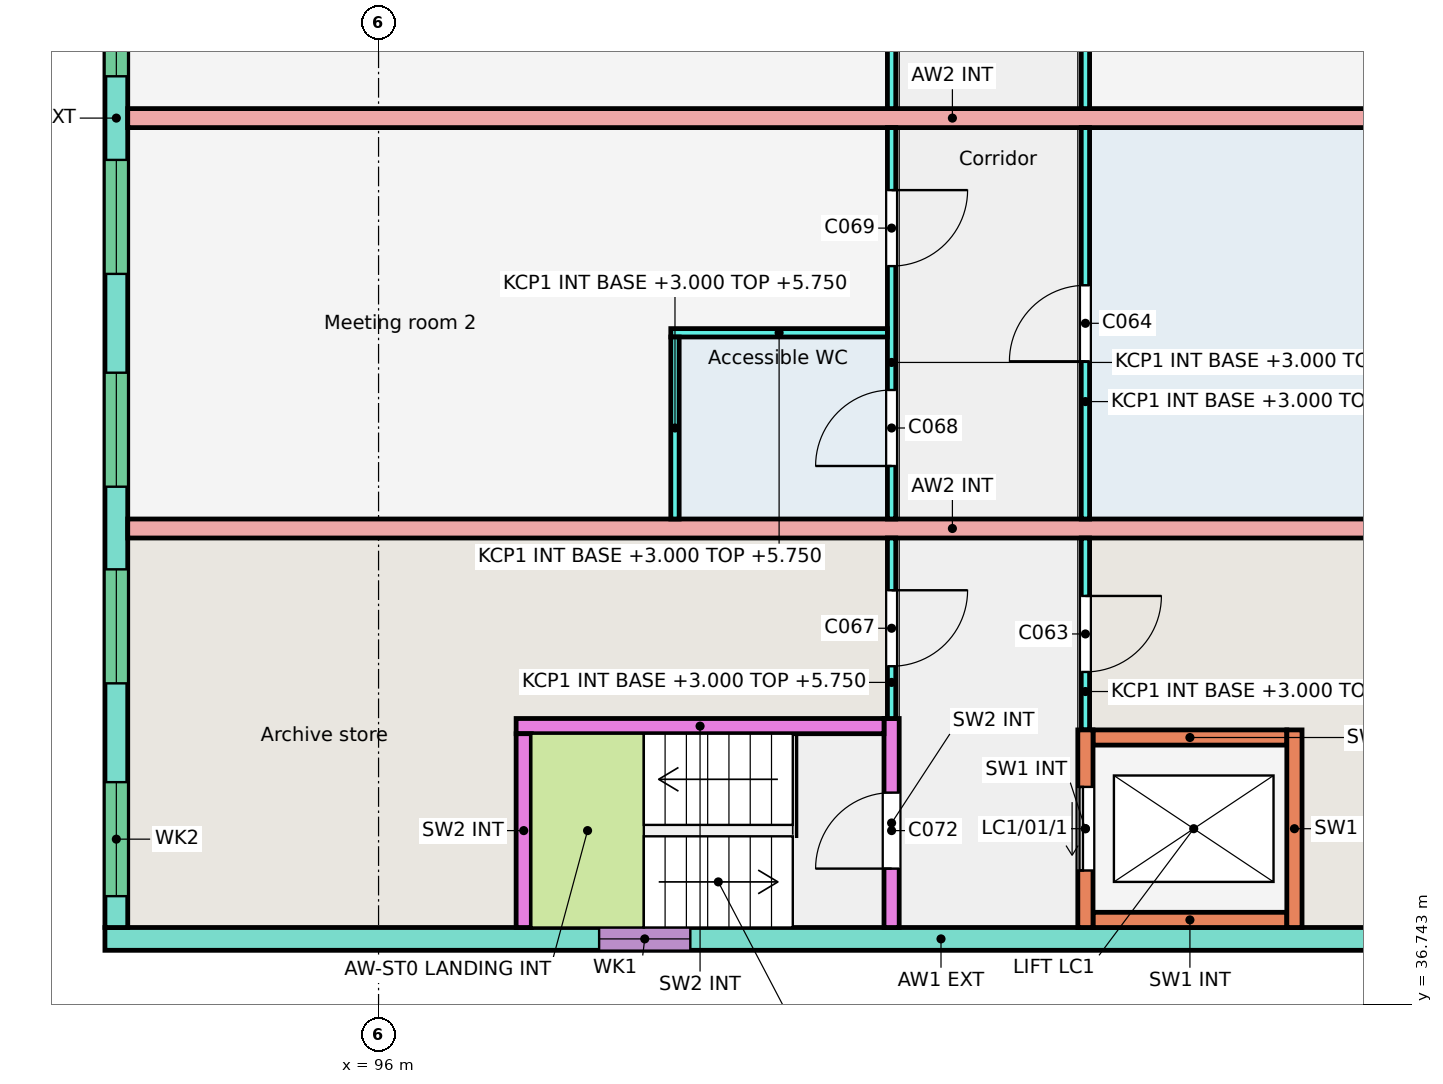
"""IFC4 building model, lengths in metres.
Left out: names, types, materials, properties, quantities, classifications, styles, units other than length and angle.
Written with IfcOpenShell. Run it as: python <this file> out.ifc"""

import sys

from ifc_helpers import new_model, si_unit, direction, frame, frame_2d, origin, place, context, subcontext, project, spatial, rectangle, extrude, element, fill, save


model = new_model("IFC4")
c1 = context("Model", 3, precision=1e-05, world=origin(), true_north=direction((0.0, 1.0)))
c2 = subcontext(c1, "Body", "Model", "MODEL_VIEW")
j1 = project(units=[si_unit("LENGTHUNIT", "METRE"), si_unit("PLANEANGLEUNIT", "RADIAN")], contexts=[c1])
p1 = place(None, origin())
s1 = spatial("IfcSite", under=j1, at=p1, CompositionType="ELEMENT")
p2 = place(p1, origin())
s2 = spatial("IfcBuilding", under=s1, at=p2, CompositionType="ELEMENT")
p3 = place(p2, frame((0.0, 0.0, 3.0)))
s3 = spatial("IfcBuildingStorey", under=s2, at=p3, CompositionType="ELEMENT", Elevation=3.0)
p4 = place(p3, frame((114.4, 37.6, 0.0), z_axis=(0.0, 0.0, 1.0), x_axis=(-1.0, 0.0, 0.0)))
e1 = element("IfcWall", 1, at=p4, inside=s3, PredefinedType="SOLIDWALL", context=c2, shape_type="SweptSolid", body=[
    extrude(rectangle(XDim=22.0, YDim=0.3, at=frame_2d((11.0, 0.0))), origin(), (0.0, 0.0, 1.0), 3.0),
])
p5 = place(p4, frame((14.298, 0.0, 0.9)))
e2 = element("IfcOpeningElement", 2, at=p5, cuts=e1, PredefinedType="OPENING", context=c2, shape_type="SweptSolid", body=[
    extrude(rectangle(XDim=1.2, YDim=1.5, at=frame_2d((0.6, 0.75))), frame((0.0, 0.16, 0.0), z_axis=(0.0, -1.0, 0.0), x_axis=(1.0, 0.0, 0.0)), (0.0, 0.0, 1.0), 0.32),
])
p6 = place(p3, frame((92.55, 37.75, 0.0), z_axis=(0.0, 0.0, 1.0), x_axis=(0.0, 1.0, 0.0)))
e3 = element("IfcWall", 3, at=p6, inside=s3, PredefinedType="SOLIDWALL", context=c2, shape_type="SweptSolid", body=[
    extrude(rectangle(XDim=21.3, YDim=0.3, at=frame_2d((10.65, 0.0))), origin(), (0.0, 0.0, 1.0), 3.0),
])
p7 = place(p6, frame((0.413, 0.0, 0.9)))
e4 = element("IfcOpeningElement", 4, at=p7, cuts=e3, PredefinedType="OPENING", context=c2, shape_type="SweptSolid", body=[
    extrude(rectangle(XDim=1.5, YDim=1.4, at=frame_2d((0.75, 0.7))), frame((0.0, 0.16, 0.0), z_axis=(0.0, -1.0, 0.0), x_axis=(1.0, 0.0, 0.0)), (0.0, 0.0, 1.0), 0.32),
])
p8 = place(p6, frame((3.212, 0.0, 0.9)))
e5 = element("IfcOpeningElement", 5, at=p8, cuts=e3, PredefinedType="OPENING", context=c2, shape_type="SweptSolid", body=[
    extrude(rectangle(XDim=1.5, YDim=1.4, at=frame_2d((0.75, 0.7))), frame((0.0, 0.16, 0.0), z_axis=(0.0, -1.0, 0.0), x_axis=(1.0, 0.0, 0.0)), (0.0, 0.0, 1.0), 0.32),
])
p9 = place(p6, frame((5.8, 0.0, 0.9)))
e6 = element("IfcOpeningElement", 6, at=p9, cuts=e3, PredefinedType="OPENING", context=c2, shape_type="SweptSolid", body=[
    extrude(rectangle(XDim=1.5, YDim=1.4, at=frame_2d((0.75, 0.7))), frame((0.0, 0.16, 0.0), z_axis=(0.0, -1.0, 0.0), x_axis=(1.0, 0.0, 0.0)), (0.0, 0.0, 1.0), 0.32),
])
p10 = place(p6, frame((8.6, 0.0, 0.9)))
e7 = element("IfcOpeningElement", 7, at=p10, cuts=e3, PredefinedType="OPENING", context=c2, shape_type="SweptSolid", body=[
    extrude(rectangle(XDim=1.5, YDim=1.4, at=frame_2d((0.75, 0.7))), frame((0.0, 0.16, 0.0), z_axis=(0.0, -1.0, 0.0), x_axis=(1.0, 0.0, 0.0)), (0.0, 0.0, 1.0), 0.32),
])
p11 = place(p6, frame((11.2, 0.0, 0.9)))
e8 = element("IfcOpeningElement", 8, at=p11, cuts=e3, PredefinedType="OPENING", context=c2, shape_type="SweptSolid", body=[
    extrude(rectangle(XDim=1.5, YDim=1.4, at=frame_2d((0.75, 0.7))), frame((0.0, 0.16, 0.0), z_axis=(0.0, -1.0, 0.0), x_axis=(1.0, 0.0, 0.0)), (0.0, 0.0, 1.0), 0.32),
])
p12 = place(p6, frame((14.0, 0.0, 0.9)))
e9 = element("IfcOpeningElement", 9, at=p12, cuts=e3, PredefinedType="OPENING", context=c2, shape_type="SweptSolid", body=[
    extrude(rectangle(XDim=1.5, YDim=1.4, at=frame_2d((0.75, 0.7))), frame((0.0, 0.16, 0.0), z_axis=(0.0, -1.0, 0.0), x_axis=(1.0, 0.0, 0.0)), (0.0, 0.0, 1.0), 0.32),
])
p13 = place(p6, frame((16.587, 0.0, 0.9)))
e10 = element("IfcOpeningElement", 10, at=p13, cuts=e3, PredefinedType="OPENING", context=c2, shape_type="SweptSolid", body=[
    extrude(rectangle(XDim=1.5, YDim=1.4, at=frame_2d((0.75, 0.7))), frame((0.0, 0.16, 0.0), z_axis=(0.0, -1.0, 0.0), x_axis=(1.0, 0.0, 0.0)), (0.0, 0.0, 1.0), 0.32),
])
p14 = place(p6, frame((19.387, 0.0, 0.9)))
e11 = element("IfcOpeningElement", 11, at=p14, cuts=e3, PredefinedType="OPENING", context=c2, shape_type="SweptSolid", body=[
    extrude(rectangle(XDim=1.5, YDim=1.4, at=frame_2d((0.75, 0.7))), frame((0.0, 0.16, 0.0), z_axis=(0.0, -1.0, 0.0), x_axis=(1.0, 0.0, 0.0)), (0.0, 0.0, 1.0), 0.32),
])
for number, where, z_axis, x_axis in (
    (12, (114.4, 43.0, 0.0), (0.0, 0.0, 1.0), (-1.0, 0.0, 0.0)),
    (13, (114.4, 48.4, 0.0), (0.0, 0.0, 1.0), (-1.0, 0.0, 0.0)),
):
    element("IfcWall", number, at=place(p3, frame(where, z_axis=z_axis, x_axis=x_axis)), inside=s3, PredefinedType="SOLIDWALL", context=c2, shape_type="SweptSolid", body=[
        extrude(rectangle(XDim=21.7, YDim=0.25, at=frame_2d((10.85, 0.0))), origin(), (0.0, 0.0, 1.0), 3.0),
    ])
p15 = place(p3, frame((105.3, 40.35, 0.0), z_axis=(0.0, 0.0, 1.0), x_axis=(0.0, 1.0, 0.0)))
e14 = element("IfcWall", 14, at=p15, inside=s3, PredefinedType="PARTITIONING", context=c2, shape_type="SweptSolid", body=[
    extrude(rectangle(XDim=2.525, YDim=0.11, at=frame_2d((1.262, 0.0))), origin(), (0.0, 0.0, 1.0), 2.75),
])
p16 = place(p15, frame((0.762, 0.0, 0.0)))
e15 = element("IfcOpeningElement", 15, at=p16, cuts=e14, PredefinedType="OPENING", context=c2, shape_type="SweptSolid", body=[
    extrude(rectangle(XDim=1.0, YDim=2.1, at=frame_2d((0.5, 1.05))), frame((0.0, 0.065, 0.0), z_axis=(0.0, -1.0, 0.0), x_axis=(1.0, 0.0, 0.0)), (0.0, 0.0, 1.0), 0.13),
])
p17 = place(p3, frame((105.3, 43.125, 0.0), z_axis=(0.0, 0.0, 1.0), x_axis=(0.0, 1.0, 0.0)))
e16 = element("IfcWall", 16, at=p17, inside=s3, PredefinedType="PARTITIONING", context=c2, shape_type="SweptSolid", body=[
    extrude(rectangle(XDim=5.15, YDim=0.11, at=frame_2d((2.575, 0.0))), origin(), (0.0, 0.0, 1.0), 2.75),
])
p18 = place(p17, frame((2.075, 0.0, 0.0)))
e17 = element("IfcOpeningElement", 17, at=p18, cuts=e16, PredefinedType="OPENING", context=c2, shape_type="SweptSolid", body=[
    extrude(rectangle(XDim=1.0, YDim=2.1, at=frame_2d((0.5, 1.05))), frame((0.0, 0.065, 0.0), z_axis=(0.0, -1.0, 0.0), x_axis=(1.0, 0.0, 0.0)), (0.0, 0.0, 1.0), 0.13),
])
p19 = place(p3, frame((105.3, 48.525, 0.0), z_axis=(0.0, 0.0, 1.0), x_axis=(0.0, 1.0, 0.0)))
e18 = element("IfcWall", 18, at=p19, inside=s3, PredefinedType="PARTITIONING", context=c2, shape_type="SweptSolid", body=[
    extrude(rectangle(XDim=5.15, YDim=0.11, at=frame_2d((2.575, 0.0))), origin(), (0.0, 0.0, 1.0), 2.75),
])
p20 = place(p19, frame((2.075, 0.0, 0.0)))
e19 = element("IfcOpeningElement", 19, at=p20, cuts=e18, PredefinedType="OPENING", context=c2, shape_type="SweptSolid", body=[
    extrude(rectangle(XDim=1.0, YDim=2.1, at=frame_2d((0.5, 1.05))), frame((0.0, 0.065, 0.0), z_axis=(0.0, -1.0, 0.0), x_axis=(1.0, 0.0, 0.0)), (0.0, 0.0, 1.0), 0.13),
])
p21 = place(p3, frame((102.75, 37.75, 0.0), z_axis=(0.0, 0.0, 1.0), x_axis=(0.0, 1.0, 0.0)))
e20 = element("IfcWall", 20, at=p21, inside=s3, PredefinedType="SOLIDWALL", context=c2, shape_type="SweptSolid", body=[
    extrude(rectangle(XDim=2.75, YDim=0.2, at=frame_2d((1.375, 0.0))), origin(), (0.0, 0.0, 1.0), 2.75),
])
p22 = place(p21, frame((0.775, 0.0, 0.0)))
e21 = element("IfcOpeningElement", 21, at=p22, cuts=e20, PredefinedType="OPENING", context=c2, shape_type="SweptSolid", body=[
    extrude(rectangle(XDim=1.0, YDim=2.1, at=frame_2d((0.5, 1.05))), frame((0.0, 0.11, 0.0), z_axis=(0.0, -1.0, 0.0), x_axis=(1.0, 0.0, 0.0)), (0.0, 0.0, 1.0), 0.22),
])
p23 = place(p3, frame((102.75, 40.5, 0.0), z_axis=(0.0, 0.0, 1.0), x_axis=(0.0, 1.0, 0.0)))
e22 = element("IfcWall", 22, at=p23, inside=s3, PredefinedType="PARTITIONING", context=c2, shape_type="SweptSolid", body=[
    extrude(rectangle(XDim=2.375, YDim=0.11, at=frame_2d((1.188, 0.0))), origin(), (0.0, 0.0, 1.0), 2.75),
])
p24 = place(p23, frame((0.688, 0.0, 0.0)))
e23 = element("IfcOpeningElement", 23, at=p24, cuts=e22, PredefinedType="OPENING", context=c2, shape_type="SweptSolid", body=[
    extrude(rectangle(XDim=1.0, YDim=2.1, at=frame_2d((0.5, 1.05))), frame((0.0, 0.065, 0.0), z_axis=(0.0, -1.0, 0.0), x_axis=(1.0, 0.0, 0.0)), (0.0, 0.0, 1.0), 0.13),
])
p25 = place(p3, frame((102.75, 43.125, 0.0), z_axis=(0.0, 0.0, 1.0), x_axis=(0.0, 1.0, 0.0)))
e24 = element("IfcWall", 24, at=p25, inside=s3, PredefinedType="PARTITIONING", context=c2, shape_type="SweptSolid", body=[
    extrude(rectangle(XDim=5.15, YDim=0.11, at=frame_2d((2.575, 0.0))), origin(), (0.0, 0.0, 1.0), 2.75),
])
p26 = place(p25, frame((0.698, 0.0, 0.0)))
e25 = element("IfcOpeningElement", 25, at=p26, cuts=e24, PredefinedType="OPENING", context=c2, shape_type="SweptSolid", body=[
    extrude(rectangle(XDim=1.0, YDim=2.1, at=frame_2d((0.5, 1.05))), frame((0.0, 0.065, 0.0), z_axis=(0.0, -1.0, 0.0), x_axis=(1.0, 0.0, 0.0)), (0.0, 0.0, 1.0), 0.13),
])
p27 = place(p25, frame((3.327, 0.0, 0.0)))
e26 = element("IfcOpeningElement", 26, at=p27, cuts=e24, PredefinedType="OPENING", context=c2, shape_type="SweptSolid", body=[
    extrude(rectangle(XDim=1.0, YDim=2.1, at=frame_2d((0.5, 1.05))), frame((0.0, 0.065, 0.0), z_axis=(0.0, -1.0, 0.0), x_axis=(1.0, 0.0, 0.0)), (0.0, 0.0, 1.0), 0.13),
])
p28 = place(p3, frame((102.75, 48.525, 0.0), z_axis=(0.0, 0.0, 1.0), x_axis=(0.0, 1.0, 0.0)))
e27 = element("IfcWall", 27, at=p28, inside=s3, PredefinedType="PARTITIONING", context=c2, shape_type="SweptSolid", body=[
    extrude(rectangle(XDim=5.15, YDim=0.11, at=frame_2d((2.575, 0.0))), origin(), (0.0, 0.0, 1.0), 2.75),
])
p29 = place(p28, frame((2.075, 0.0, 0.0)))
e28 = element("IfcOpeningElement", 28, at=p29, cuts=e27, PredefinedType="OPENING", context=c2, shape_type="SweptSolid", body=[
    extrude(rectangle(XDim=1.0, YDim=2.1, at=frame_2d((0.5, 1.05))), frame((0.0, 0.065, 0.0), z_axis=(0.0, -1.0, 0.0), x_axis=(1.0, 0.0, 0.0)), (0.0, 0.0, 1.0), 0.13),
])
p30 = place(p3, frame((102.65, 40.4, 0.0), z_axis=(0.0, 0.0, 1.0), x_axis=(-1.0, 0.0, 0.0)))
e29 = element("IfcWall", 29, at=p30, inside=s3, PredefinedType="SOLIDWALL", context=c2, shape_type="SweptSolid", body=[
    extrude(rectangle(XDim=4.84, YDim=0.2, at=frame_2d((2.42, 0.0))), origin(), (0.0, 0.0, 1.0), 2.75),
])
p31 = place(p3, frame((97.91, 37.75, 0.0), z_axis=(0.0, 0.0, 1.0), x_axis=(0.0, 1.0, 0.0)))
e30 = element("IfcWall", 30, at=p31, inside=s3, PredefinedType="SOLIDWALL", context=c2, shape_type="SweptSolid", body=[
    extrude(rectangle(XDim=2.55, YDim=0.2, at=frame_2d((1.275, 0.0))), origin(), (0.0, 0.0, 1.0), 2.75),
])
p32 = place(p3, frame((102.695, 45.575, 0.0), z_axis=(0.0, 0.0, 1.0), x_axis=(-1.0, 0.0, 0.0)))
e31 = element("IfcWall", 31, at=p32, inside=s3, PredefinedType="PARTITIONING", context=c2, shape_type="SweptSolid", body=[
    extrude(rectangle(XDim=2.85, YDim=0.11, at=frame_2d((1.425, 0.0))), origin(), (0.0, 0.0, 1.0), 2.75),
])
p33 = place(p3, frame((99.9, 43.125, 0.0), z_axis=(0.0, 0.0, 1.0), x_axis=(0.0, 1.0, 0.0)))
e32 = element("IfcWall", 32, at=p33, inside=s3, PredefinedType="PARTITIONING", context=c2, shape_type="SweptSolid", body=[
    extrude(rectangle(XDim=2.395, YDim=0.11, at=frame_2d((1.198, 0.0))), origin(), (0.0, 0.0, 1.0), 2.75),
])
for number, where, z_axis, x_axis in (
    (33, (107.95, 40.25, 0.0), (0.0, 0.0, 1.0), (-1.0, 0.0, 0.0)),
    (34, (107.95, 37.85, 0.0), (0.0, 0.0, 1.0), (-1.0, 0.0, 0.0)),
):
    element("IfcWall", number, at=place(p3, frame(where, z_axis=z_axis, x_axis=x_axis)), inside=s3, PredefinedType="SOLIDWALL", context=c2, shape_type="SweptSolid", body=[
        extrude(rectangle(XDim=2.55, YDim=0.2, at=frame_2d((1.275, 0.0))), origin(), (0.0, 0.0, 1.0), 3.0),
    ])
p34 = place(p3, frame((108.05, 37.75, 0.0), z_axis=(0.0, 0.0, 1.0), x_axis=(0.0, 1.0, 0.0)))
e35 = element("IfcWall", 35, at=p34, inside=s3, PredefinedType="SOLIDWALL", context=c2, shape_type="SweptSolid", body=[
    extrude(rectangle(XDim=2.6, YDim=0.2, at=frame_2d((1.3, 0.0))), origin(), (0.0, 0.0, 1.0), 3.0),
])
p35 = place(p3, frame((105.3, 37.75, 0.0), z_axis=(0.0, 0.0, 1.0), x_axis=(0.0, 1.0, 0.0)))
e36 = element("IfcWall", 36, at=p35, inside=s3, PredefinedType="SOLIDWALL", context=c2, shape_type="SweptSolid", body=[
    extrude(rectangle(XDim=2.6, YDim=0.2, at=frame_2d((1.3, 0.0))), origin(), (0.0, 0.0, 1.0), 3.0),
])
p36 = place(p35, frame((0.75, 0.0, 0.0)))
e37 = element("IfcOpeningElement", 37, at=p36, cuts=e36, PredefinedType="OPENING", context=c2, shape_type="SweptSolid", body=[
    extrude(rectangle(XDim=1.1, YDim=2.1, at=frame_2d((0.55, 1.05))), frame((0.0, 0.11, 0.0), z_axis=(0.0, -1.0, 0.0), x_axis=(1.0, 0.0, 0.0)), (0.0, 0.0, 1.0), 0.22),
])
p37 = place(p7, origin())
e38 = element("IfcWindow", 38, at=p37, inside=s3, PartitioningType="SINGLE_PANEL", PredefinedType="WINDOW", context=c2, shape_type="SweptSolid", body=[
    extrude(rectangle(XDim=1.5, YDim=1.4, at=frame_2d((0.75, 0.7))), frame((0.0, 0.03, 0.0), z_axis=(0.0, -1.0, 0.0), x_axis=(1.0, 0.0, 0.0)), (0.0, 0.0, 1.0), 0.06),
])
fill(e4, e38)
p38 = place(p8, origin())
e39 = element("IfcWindow", 39, at=p38, inside=s3, PartitioningType="SINGLE_PANEL", PredefinedType="WINDOW", context=c2, shape_type="SweptSolid", body=[
    extrude(rectangle(XDim=1.5, YDim=1.4, at=frame_2d((0.75, 0.7))), frame((0.0, 0.03, 0.0), z_axis=(0.0, -1.0, 0.0), x_axis=(1.0, 0.0, 0.0)), (0.0, 0.0, 1.0), 0.06),
])
fill(e5, e39)
p39 = place(p9, origin())
e40 = element("IfcWindow", 40, at=p39, inside=s3, PartitioningType="SINGLE_PANEL", PredefinedType="WINDOW", context=c2, shape_type="SweptSolid", body=[
    extrude(rectangle(XDim=1.5, YDim=1.4, at=frame_2d((0.75, 0.7))), frame((0.0, 0.03, 0.0), z_axis=(0.0, -1.0, 0.0), x_axis=(1.0, 0.0, 0.0)), (0.0, 0.0, 1.0), 0.06),
])
fill(e6, e40)
p40 = place(p10, origin())
e41 = element("IfcWindow", 41, at=p40, inside=s3, PartitioningType="SINGLE_PANEL", PredefinedType="WINDOW", context=c2, shape_type="SweptSolid", body=[
    extrude(rectangle(XDim=1.5, YDim=1.4, at=frame_2d((0.75, 0.7))), frame((0.0, 0.03, 0.0), z_axis=(0.0, -1.0, 0.0), x_axis=(1.0, 0.0, 0.0)), (0.0, 0.0, 1.0), 0.06),
])
fill(e7, e41)
p41 = place(p11, origin())
e42 = element("IfcWindow", 42, at=p41, inside=s3, PartitioningType="SINGLE_PANEL", PredefinedType="WINDOW", context=c2, shape_type="SweptSolid", body=[
    extrude(rectangle(XDim=1.5, YDim=1.4, at=frame_2d((0.75, 0.7))), frame((0.0, 0.03, 0.0), z_axis=(0.0, -1.0, 0.0), x_axis=(1.0, 0.0, 0.0)), (0.0, 0.0, 1.0), 0.06),
])
fill(e8, e42)
p42 = place(p5, origin())
e43 = element("IfcWindow", 43, at=p42, inside=s3, PartitioningType="SINGLE_PANEL", PredefinedType="WINDOW", context=c2, shape_type="SweptSolid", body=[
    extrude(rectangle(XDim=1.2, YDim=1.5, at=frame_2d((0.6, 0.75))), frame((0.0, 0.03, 0.0), z_axis=(0.0, -1.0, 0.0), x_axis=(1.0, 0.0, 0.0)), (0.0, 0.0, 1.0), 0.06),
])
fill(e2, e43)
p43 = place(p16, origin())
e44 = element("IfcDoor", 44, at=p43, inside=s3, OperationType="SINGLE_SWING_RIGHT", PredefinedType="DOOR", context=c2, shape_type="SweptSolid", body=[
    extrude(rectangle(XDim=1.0, YDim=2.1, at=frame_2d((0.5, 1.05))), frame((0.0, 0.025, 0.0), z_axis=(0.0, -1.0, 0.0), x_axis=(1.0, 0.0, 0.0)), (0.0, 0.0, 1.0), 0.05),
])
fill(e15, e44)
p44 = place(p18, origin())
e45 = element("IfcDoor", 45, at=p44, inside=s3, OperationType="SINGLE_SWING_LEFT", PredefinedType="DOOR", context=c2, shape_type="SweptSolid", body=[
    extrude(rectangle(XDim=1.0, YDim=2.1, at=frame_2d((0.5, 1.05))), frame((0.0, 0.025, 0.0), z_axis=(0.0, -1.0, 0.0), x_axis=(1.0, 0.0, 0.0)), (0.0, 0.0, 1.0), 0.05),
])
fill(e17, e45)
p45 = place(p24, origin())
e46 = element("IfcDoor", 46, at=p45, inside=s3, OperationType="SINGLE_SWING_RIGHT", PredefinedType="DOOR", context=c2, shape_type="SweptSolid", body=[
    extrude(rectangle(XDim=1.0, YDim=2.1, at=frame_2d((0.5, 1.05))), frame((0.0, 0.025, 0.0), z_axis=(0.0, -1.0, 0.0), x_axis=(1.0, 0.0, 0.0)), (0.0, 0.0, 1.0), 0.05),
])
fill(e23, e46)
p46 = place(p26, origin())
e47 = element("IfcDoor", 47, at=p46, inside=s3, OperationType="SINGLE_SWING_LEFT", PredefinedType="DOOR", context=c2, shape_type="SweptSolid", body=[
    extrude(rectangle(XDim=1.0, YDim=2.1, at=frame_2d((0.5, 1.05))), frame((0.0, 0.025, 0.0), z_axis=(0.0, -1.0, 0.0), x_axis=(1.0, 0.0, 0.0)), (0.0, 0.0, 1.0), 0.05),
])
fill(e25, e47)
p47 = place(p27, origin())
e48 = element("IfcDoor", 48, at=p47, inside=s3, OperationType="SINGLE_SWING_RIGHT", PredefinedType="DOOR", context=c2, shape_type="SweptSolid", body=[
    extrude(rectangle(XDim=1.0, YDim=2.1, at=frame_2d((0.5, 1.05))), frame((0.0, 0.025, 0.0), z_axis=(0.0, -1.0, 0.0), x_axis=(1.0, 0.0, 0.0)), (0.0, 0.0, 1.0), 0.05),
])
fill(e26, e48)
p48 = place(p22, origin())
e49 = element("IfcDoor", 49, at=p48, inside=s3, OperationType="SINGLE_SWING_LEFT", PredefinedType="DOOR", context=c2, shape_type="SweptSolid", body=[
    extrude(rectangle(XDim=1.0, YDim=2.1, at=frame_2d((0.5, 1.05))), frame((0.0, 0.025, 0.0), z_axis=(0.0, -1.0, 0.0), x_axis=(1.0, 0.0, 0.0)), (0.0, 0.0, 1.0), 0.05),
])
fill(e21, e49)
p49 = place(p36, origin())
e50 = element("IfcDoor", 50, at=p49, inside=s3, OperationType="SLIDING_TO_LEFT", PredefinedType="DOOR", context=c2, shape_type="SweptSolid", body=[
    extrude(rectangle(XDim=1.1, YDim=2.1, at=frame_2d((0.55, 1.05))), frame((0.0, 0.025, 0.0), z_axis=(0.0, -1.0, 0.0), x_axis=(1.0, 0.0, 0.0)), (0.0, 0.0, 1.0), 0.05),
])
fill(e37, e50)
save(model, sys.argv[1])
